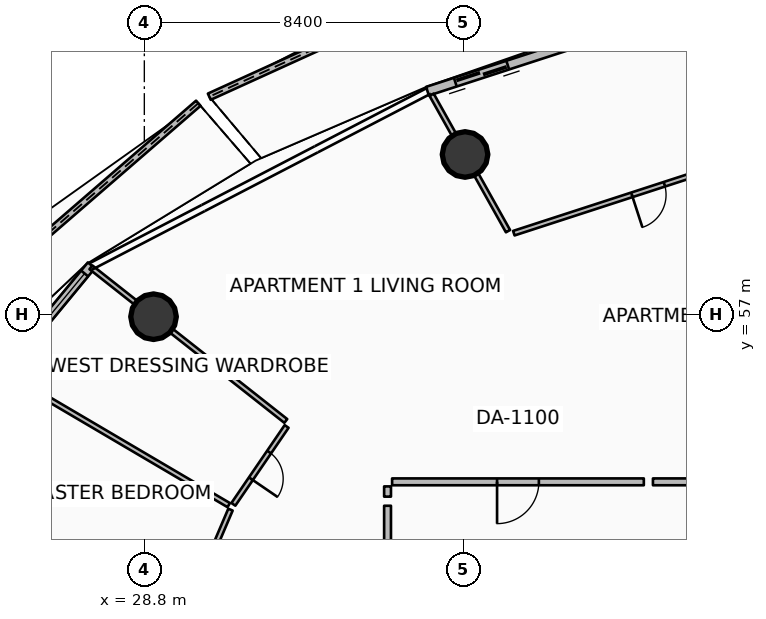
"""IFC4 building model, lengths in metres.
Left out: names, types, materials, properties, quantities, classifications, styles, units other than length and angle.
Written with IfcOpenShell. Run it as: python <this file> out.ifc"""

import sys

from ifc_helpers import new_model, si_unit, direction, frame, frame_2d, origin, origin_2d, place, context, subcontext, project, spatial, polyline, rectangle, circle, outline, extrude, element, fill, save


model = new_model("IFC4")
c1 = context("Model", 3, precision=1e-05, world=origin(), true_north=direction((0.0, 1.0)))
c2 = subcontext(c1, "Body", "Model", "MODEL_VIEW")
j1 = project(units=[si_unit("LENGTHUNIT", "METRE"), si_unit("PLANEANGLEUNIT", "RADIAN")], contexts=[c1])
p1 = place(None, origin())
s1 = spatial("IfcSite", under=j1, at=p1, CompositionType="ELEMENT")
p2 = place(p1, origin())
s2 = spatial("IfcBuilding", under=s1, at=p2, CompositionType="ELEMENT")
p3 = place(p2, frame((0.0, 0.0, 90.15)))
s3 = spatial("IfcBuildingStorey", under=s2, at=p3, CompositionType="ELEMENT", Elevation=90.15)
for number, where, z_axis, x_axis in (
    (1, (37.24, 61.214, 0.0), (0.0, 0.0, 1.0), (1.0, 0.0, 0.0)),
    (2, (29.042, 56.945, 0.0), (0.0, 0.0, 1.0), (1.0, 0.0, 0.0)),
):
    element("IfcColumn", number, at=place(p3, frame(where, z_axis=z_axis, x_axis=x_axis)), inside=s3, PredefinedType="COLUMN", context=c2, shape_type="SweptSolid", body=[
        extrude(circle(Radius=0.6, at=origin_2d()), origin(), (0.0, 0.0, 1.0), 3.5),
    ])
p4 = place(p3, frame((39.769, 66.947, 0.0), z_axis=(0.0, 0.0, 1.0), x_axis=(-0.910226702808, -0.41411031078, 0.0)))
e3 = element("IfcWall", 3, at=p4, inside=s3, PredefinedType="PARAPET", context=c2, shape_type="SweptSolid", body=[
    extrude(outline(polyline([(0.0, 0.0), (10.173, 0.0), (10.173, 1.497), (5.086, 1.696), (0.0, 1.832), (0.0, 0.0)])), frame((0.0, 0.09, 0.0), z_axis=(0.0, -1.0, 0.0), x_axis=(1.0, 0.0, 0.0)), (0.0, 0.0, 1.0), 0.18),
])
p5 = place(p3, frame((30.22, 62.562, 0.0), z_axis=(0.0, 0.0, 1.0), x_axis=(-0.756090126882, -0.654467508766, 0.0)))
e4 = element("IfcWall", 4, at=p5, inside=s3, PredefinedType="PARAPET", context=c2, shape_type="SweptSolid", body=[
    extrude(outline(polyline([(0.0, 0.0), (10.943, 0.0), (10.943, 1.148), (5.471, 1.284), (0.0, 1.483), (0.0, 0.0)])), frame((0.0, 0.09, 0.0), z_axis=(0.0, -1.0, 0.0), x_axis=(1.0, 0.0, 0.0)), (0.0, 0.0, 1.0), 0.18),
])
p6 = place(p3, frame((45.233, 65.797, 0.0), z_axis=(0.0, 0.0, 1.0), x_axis=(-0.951052494852, -0.30902937083, 0.0)))
e5 = element("IfcWall", 5, at=p6, inside=s3, PredefinedType="SOLIDWALL", context=c2, shape_type="SweptSolid", body=[
    extrude(rectangle(XDim=9.444, YDim=0.24, at=frame_2d((4.722, 0.0))), origin(), (0.0, 0.0, 1.0), 2.45),
])
p7 = place(p6, frame((7.224, 0.0, 0.0)))
e6 = element("IfcOpeningElement", 6, at=p7, cuts=e5, PredefinedType="OPENING", context=c2, shape_type="SweptSolid", body=[
    extrude(rectangle(XDim=1.45, YDim=2.15, at=frame_2d((0.725, 1.075))), frame((0.0, 0.13, 0.0), z_axis=(0.0, -1.0, 0.0), x_axis=(1.0, 0.0, 0.0)), (0.0, 0.0, 1.0), 0.26),
])
p8 = place(p6, frame((0.28, 0.0, 0.65)))
e7 = element("IfcOpeningElement", 7, at=p8, cuts=e5, PredefinedType="OPENING", context=c2, shape_type="SweptSolid", body=[
    extrude(rectangle(XDim=1.6, YDim=1.5, at=frame_2d((0.8, 0.75))), frame((0.0, 0.13, 0.0), z_axis=(0.0, -1.0, 0.0), x_axis=(1.0, 0.0, 0.0)), (0.0, 0.0, 1.0), 0.26),
])
p9 = place(p3, frame((27.407, 58.298, 0.0), z_axis=(0.0, 0.0, 1.0), x_axis=(-0.636704975, -0.771107498868, 0.0)))
e8 = element("IfcWall", 8, at=p9, inside=s3, PredefinedType="SOLIDWALL", context=c2, shape_type="SweptSolid", body=[
    extrude(rectangle(XDim=11.084, YDim=0.24, at=frame_2d((5.542, 0.0))), origin(), (0.0, 0.0, 1.0), 2.45),
])
p10 = place(p9, frame((8.864, 0.0, 0.0)))
e9 = element("IfcOpeningElement", 9, at=p10, cuts=e8, PredefinedType="OPENING", context=c2, shape_type="SweptSolid", body=[
    extrude(rectangle(XDim=1.45, YDim=2.15, at=frame_2d((0.725, 1.075))), frame((0.0, 0.13, 0.0), z_axis=(0.0, -1.0, 0.0), x_axis=(1.0, 0.0, 0.0)), (0.0, 0.0, 1.0), 0.26),
])
p11 = place(p9, frame((0.28, 0.0, 0.65)))
e10 = element("IfcOpeningElement", 10, at=p11, cuts=e8, PredefinedType="OPENING", context=c2, shape_type="SweptSolid", body=[
    extrude(rectangle(XDim=1.6, YDim=1.5, at=frame_2d((0.8, 0.75))), frame((0.0, 0.13, 0.0), z_axis=(0.0, -1.0, 0.0), x_axis=(1.0, 0.0, 0.0)), (0.0, 0.0, 1.0), 0.26),
])
p12 = place(p3, frame((41.944, 52.6, 0.0), z_axis=(0.0, 0.0, 1.0), x_axis=(-1.0, 0.0, 0.0)))
e11 = element("IfcWall", 11, at=p12, inside=s3, PredefinedType="PARTITIONING", context=c2, shape_type="SweptSolid", body=[
    extrude(rectangle(XDim=6.624, YDim=0.18, at=frame_2d((3.312, 0.0))), origin(), (0.0, 0.0, 1.0), 2.94),
])
p13 = place(p12, frame((2.762, 0.0, 0.0)))
e12 = element("IfcOpeningElement", 12, at=p13, cuts=e11, PredefinedType="OPENING", context=c2, shape_type="SweptSolid", body=[
    extrude(rectangle(XDim=1.1, YDim=2.1, at=frame_2d((0.55, 1.05))), frame((0.0, 0.1, 0.0), z_axis=(0.0, -1.0, 0.0), x_axis=(1.0, 0.0, 0.0)), (0.0, 0.0, 1.0), 0.2),
])
p14 = place(p3, frame((35.2, 52.48, 0.0), z_axis=(0.0, 0.0, 1.0), x_axis=(0.0, -1.0, 0.0)))
e13 = element("IfcWall", 13, at=p14, inside=s3, PredefinedType="PARTITIONING", context=c2, shape_type="SweptSolid", body=[
    extrude(rectangle(XDim=0.269, YDim=0.18, at=frame_2d((0.135, 0.0))), origin(), (0.0, 0.0, 1.0), 2.94),
])
p15 = place(p3, frame((46.625, 52.6, 0.0), z_axis=(0.0, 0.0, 1.0), x_axis=(-1.0, 0.0, 0.0)))
e14 = element("IfcWall", 14, at=p15, inside=s3, PredefinedType="PARTITIONING", context=c2, shape_type="SweptSolid", body=[
    extrude(rectangle(XDim=4.442, YDim=0.18, at=frame_2d((2.221, 0.0))), origin(), (0.0, 0.0, 1.0), 2.94),
])
p16 = place(p3, frame((38.37, 59.196, 0.0), z_axis=(0.0, 0.0, 1.0), x_axis=(-0.488603368932, 0.87250601595, 0.0)))
e15 = element("IfcWall", 15, at=p16, inside=s3, PredefinedType="PARTITIONING", context=c2, shape_type="SweptSolid", body=[
    extrude(rectangle(XDim=4.113, YDim=0.125, at=frame_2d((2.057, 0.0))), origin(), (0.0, 0.0, 1.0), 2.94),
])
p17 = place(p3, frame((45.591, 61.439, 0.0), z_axis=(0.0, 0.0, 1.0), x_axis=(-0.95105434732, -0.309023669714, 0.0)))
e16 = element("IfcWall", 16, at=p17, inside=s3, PredefinedType="PARTITIONING", context=c2, shape_type="SweptSolid", body=[
    extrude(rectangle(XDim=7.431, YDim=0.125, at=frame_2d((3.716, 0.0))), origin(), (0.0, 0.0, 1.0), 2.94),
])
p18 = place(p17, frame((3.265, 0.0, 0.0)))
e17 = element("IfcOpeningElement", 17, at=p18, cuts=e16, PredefinedType="OPENING", context=c2, shape_type="SweptSolid", body=[
    extrude(rectangle(XDim=0.9, YDim=2.08, at=frame_2d((0.45, 1.04))), frame((0.0, 0.073, 0.0), z_axis=(0.0, -1.0, 0.0), x_axis=(1.0, 0.0, 0.0)), (0.0, 0.0, 1.0), 0.145),
])
p19 = place(p3, frame((35.2, 51.971, 0.0), z_axis=(0.0, 0.0, 1.0), x_axis=(0.0, -1.0, 0.0)))
e18 = element("IfcWall", 18, at=p19, inside=s3, PredefinedType="PARTITIONING", context=c2, shape_type="SweptSolid", body=[
    extrude(rectangle(XDim=6.241, YDim=0.18, at=frame_2d((3.12, 0.0))), origin(), (0.0, 0.0, 1.0), 2.94),
])
p20 = place(p3, frame((32.522, 54.202, 0.0), z_axis=(0.0, 0.0, 1.0), x_axis=(-0.785296086335, 0.619120389574, 0.0)))
e19 = element("IfcWall", 19, at=p20, inside=s3, PredefinedType="PARTITIONING", context=c2, shape_type="SweptSolid", body=[
    extrude(rectangle(XDim=6.529, YDim=0.125, at=frame_2d((3.265, 0.0))), origin(), (0.0, 0.0, 1.0), 2.94),
])
p21 = place(p3, frame((31.021, 51.988, 0.0), z_axis=(0.0, 0.0, 1.0), x_axis=(-0.86191844443, 0.507046935846, 0.0)))
e20 = element("IfcWall", 20, at=p21, inside=s3, PredefinedType="PARTITIONING", context=c2, shape_type="SweptSolid", body=[
    extrude(rectangle(XDim=6.765, YDim=0.125, at=frame_2d((3.383, 0.0))), origin(), (0.0, 0.0, 1.0), 2.94),
])
p22 = place(p3, frame((32.544, 54.057, 0.0), z_axis=(0.0, 0.0, 1.0), x_axis=(-0.564377111566, -0.825517096092, 0.0)))
e21 = element("IfcWall", 21, at=p22, inside=s3, PredefinedType="PARTITIONING", context=c2, shape_type="SweptSolid", body=[
    extrude(rectangle(XDim=2.482, YDim=0.125, at=frame_2d((1.241, 0.0))), origin(), (0.0, 0.0, 1.0), 2.94),
])
p23 = place(p22, frame((0.816, 0.0, 0.0)))
e22 = element("IfcOpeningElement", 22, at=p23, cuts=e21, PredefinedType="OPENING", context=c2, shape_type="SweptSolid", body=[
    extrude(rectangle(XDim=0.85, YDim=2.06, at=frame_2d((0.425, 1.03))), frame((0.0, 0.073, 0.0), z_axis=(0.0, -1.0, 0.0), x_axis=(1.0, 0.0, 0.0)), (0.0, 0.0, 1.0), 0.145),
])
p24 = place(p3, frame((31.067, 51.868, 0.0), z_axis=(0.0, 0.0, 1.0), x_axis=(-0.392470533914, -0.919764578579, 0.0)))
e23 = element("IfcWall", 23, at=p24, inside=s3, PredefinedType="PARTITIONING", context=c2, shape_type="SweptSolid", body=[
    extrude(rectangle(XDim=4.842, YDim=0.125, at=frame_2d((2.421, 0.0))), origin(), (0.0, 0.0, 1.0), 2.94),
])
p25 = place(p24, frame((1.971, 0.0, 0.0)))
e24 = element("IfcOpeningElement", 24, at=p25, cuts=e23, PredefinedType="OPENING", context=c2, shape_type="SweptSolid", body=[
    extrude(rectangle(XDim=0.9, YDim=2.08, at=frame_2d((0.45, 1.04))), frame((0.0, 0.073, 0.0), z_axis=(0.0, -1.0, 0.0), x_axis=(1.0, 0.0, 0.0)), (0.0, 0.0, 1.0), 0.145),
])
p26 = place(p7, origin())
e25 = element("IfcDoor", 25, at=p26, inside=s3, OperationType="DOUBLE_DOOR_SLIDING", PredefinedType="DOOR", context=c2, shape_type="SweptSolid", body=[
    extrude(rectangle(XDim=1.45, YDim=2.15, at=frame_2d((0.725, 1.075))), frame((0.0, 0.025, 0.0), z_axis=(0.0, -1.0, 0.0), x_axis=(1.0, 0.0, 0.0)), (0.0, 0.0, 1.0), 0.05),
])
fill(e6, e25)
p27 = place(p11, origin())
e26 = element("IfcWindow", 26, at=p27, inside=s3, PartitioningType="SINGLE_PANEL", PredefinedType="WINDOW", context=c2, shape_type="SweptSolid", body=[
    extrude(rectangle(XDim=1.6, YDim=1.5, at=frame_2d((0.8, 0.75))), frame((0.0, 0.03, 0.0), z_axis=(0.0, -1.0, 0.0), x_axis=(1.0, 0.0, 0.0)), (0.0, 0.0, 1.0), 0.06),
])
fill(e10, e26)
p28 = place(p13, origin())
e27 = element("IfcDoor", 27, at=p28, inside=s3, OperationType="SINGLE_SWING_RIGHT", PredefinedType="DOOR", context=c2, shape_type="SweptSolid", body=[
    extrude(rectangle(XDim=1.1, YDim=2.1, at=frame_2d((0.55, 1.05))), frame((0.0, 0.025, 0.0), z_axis=(0.0, -1.0, 0.0), x_axis=(1.0, 0.0, 0.0)), (0.0, 0.0, 1.0), 0.05),
])
fill(e12, e27)
p29 = place(p18, origin())
e28 = element("IfcDoor", 28, at=p29, inside=s3, OperationType="SINGLE_SWING_RIGHT", PredefinedType="DOOR", context=c2, shape_type="SweptSolid", body=[
    extrude(rectangle(XDim=0.9, YDim=2.08, at=frame_2d((0.45, 1.04))), frame((0.0, 0.025, 0.0), z_axis=(0.0, -1.0, 0.0), x_axis=(1.0, 0.0, 0.0)), (0.0, 0.0, 1.0), 0.05),
])
fill(e17, e28)
p30 = place(p23, origin())
e29 = element("IfcDoor", 29, at=p30, inside=s3, OperationType="SINGLE_SWING_RIGHT", PredefinedType="DOOR", context=c2, shape_type="SweptSolid", body=[
    extrude(rectangle(XDim=0.85, YDim=2.06, at=frame_2d((0.425, 1.03))), frame((0.0, 0.025, 0.0), z_axis=(0.0, -1.0, 0.0), x_axis=(1.0, 0.0, 0.0)), (0.0, 0.0, 1.0), 0.05),
])
fill(e22, e29)
save(model, sys.argv[1])
